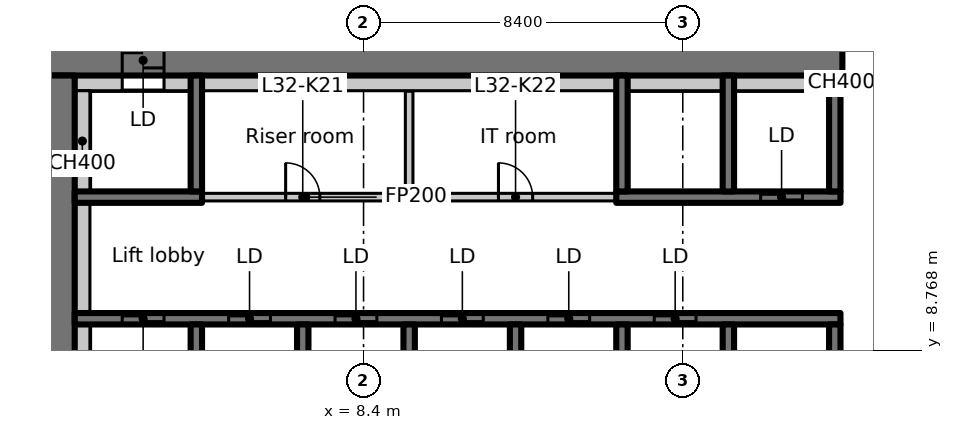
"""IFC4 building model, lengths in metres.
Left out: names, types, materials, properties, quantities, classifications, styles, units other than length and angle.
Written with IfcOpenShell. Run it as: python <this file> out.ifc"""

import sys

from ifc_helpers import new_model, si_unit, direction, frame, frame_2d, origin, place, context, subcontext, project, spatial, rectangle, extrude, element, fill, save


model = new_model("IFC4")
c1 = context("Model", 3, precision=1e-05, world=origin(), true_north=direction((0.0, 1.0)))
c2 = subcontext(c1, "Body", "Model", "MODEL_VIEW")
j1 = project(units=[si_unit("LENGTHUNIT", "METRE"), si_unit("PLANEANGLEUNIT", "RADIAN")], contexts=[c1])
p1 = place(None, origin())
s1 = spatial("IfcSite", under=j1, at=p1, CompositionType="ELEMENT")
p2 = place(p1, origin())
s2 = spatial("IfcBuilding", under=s1, at=p2, CompositionType="ELEMENT")
p3 = place(p2, frame((0.0, 0.0, 131.3)))
s3 = spatial("IfcBuildingStorey", under=s2, at=p3, CompositionType="ELEMENT", Elevation=131.3)
p4 = place(p3, frame((-1.1, 16.4, 0.0), z_axis=(0.0, 0.0, 1.0), x_axis=(1.0, 0.0, 0.0)))
e1 = element("IfcWall", 1, at=p4, inside=s3, PredefinedType="SHEAR", context=c2, shape_type="SweptSolid", body=[
    extrude(rectangle(XDim=22.1, YDim=0.8, at=frame_2d((11.05, 0.0))), origin(), (0.0, 0.0, 1.0), 3.35),
])
p5 = place(p4, frame((3.15, 0.0, 0.0)))
e2 = element("IfcOpeningElement", 2, at=p5, cuts=e1, PredefinedType="OPENING", context=c2, shape_type="SweptSolid", body=[
    extrude(rectangle(XDim=1.1, YDim=2.3, at=frame_2d((0.55, 1.15))), frame((0.0, 0.41, 0.0), z_axis=(0.0, -1.0, 0.0), x_axis=(1.0, 0.0, 0.0)), (0.0, 0.0, 1.0), 0.82),
])
p6 = place(p3, frame((0.4, 7.136, 0.0), z_axis=(0.0, 0.0, 1.0), x_axis=(0.0, 1.0, 0.0)))
e3 = element("IfcWall", 3, at=p6, inside=s3, PredefinedType="SHEAR", context=c2, shape_type="SweptSolid", body=[
    extrude(rectangle(XDim=8.864, YDim=0.8, at=frame_2d((4.432, 0.0))), origin(), (0.0, 0.0, 1.0), 3.35),
])
p7 = place(p3, frame((0.8, 15.8, 0.0), z_axis=(0.0, 0.0, 1.0), x_axis=(1.0, 0.0, 0.0)))
e4 = element("IfcWall", 4, at=p7, inside=s3, PredefinedType="PARTITIONING", context=c2, shape_type="SweptSolid", body=[
    extrude(rectangle(XDim=1.25, YDim=0.4, at=frame_2d((0.625, 0.0))), origin(), (0.0, 0.0, 1.0), 3.35),
])
p8 = place(p3, frame((0.8, 9.6, 0.0), z_axis=(0.0, 0.0, 1.0), x_axis=(1.0, 0.0, 0.0)))
e5 = element("IfcWall", 5, at=p8, inside=s3, PredefinedType="SHEAR", context=c2, shape_type="SweptSolid", body=[
    extrude(rectangle(XDim=20.15, YDim=0.3, at=frame_2d((10.075, 0.0))), origin(), (0.0, 0.0, 1.0), 3.35),
])
p9 = place(p8, frame((1.25, 0.0, 0.0)))
e6 = element("IfcOpeningElement", 6, at=p9, cuts=e5, PredefinedType="OPENING", context=c2, shape_type="SweptSolid", body=[
    extrude(rectangle(XDim=1.1, YDim=2.3, at=frame_2d((0.55, 1.15))), frame((0.0, 0.16, 0.0), z_axis=(0.0, -1.0, 0.0), x_axis=(1.0, 0.0, 0.0)), (0.0, 0.0, 1.0), 0.32),
])
p10 = place(p8, frame((4.05, 0.0, 0.0)))
e7 = element("IfcOpeningElement", 7, at=p10, cuts=e5, PredefinedType="OPENING", context=c2, shape_type="SweptSolid", body=[
    extrude(rectangle(XDim=1.1, YDim=2.3, at=frame_2d((0.55, 1.15))), frame((0.0, 0.16, 0.0), z_axis=(0.0, -1.0, 0.0), x_axis=(1.0, 0.0, 0.0)), (0.0, 0.0, 1.0), 0.32),
])
p11 = place(p8, frame((6.85, 0.0, 0.0)))
e8 = element("IfcOpeningElement", 8, at=p11, cuts=e5, PredefinedType="OPENING", context=c2, shape_type="SweptSolid", body=[
    extrude(rectangle(XDim=1.1, YDim=2.3, at=frame_2d((0.55, 1.15))), frame((0.0, 0.16, 0.0), z_axis=(0.0, -1.0, 0.0), x_axis=(1.0, 0.0, 0.0)), (0.0, 0.0, 1.0), 0.32),
])
p12 = place(p8, frame((9.65, 0.0, 0.0)))
e9 = element("IfcOpeningElement", 9, at=p12, cuts=e5, PredefinedType="OPENING", context=c2, shape_type="SweptSolid", body=[
    extrude(rectangle(XDim=1.1, YDim=2.3, at=frame_2d((0.55, 1.15))), frame((0.0, 0.16, 0.0), z_axis=(0.0, -1.0, 0.0), x_axis=(1.0, 0.0, 0.0)), (0.0, 0.0, 1.0), 0.32),
])
p13 = place(p8, frame((12.45, 0.0, 0.0)))
e10 = element("IfcOpeningElement", 10, at=p13, cuts=e5, PredefinedType="OPENING", context=c2, shape_type="SweptSolid", body=[
    extrude(rectangle(XDim=1.1, YDim=2.3, at=frame_2d((0.55, 1.15))), frame((0.0, 0.16, 0.0), z_axis=(0.0, -1.0, 0.0), x_axis=(1.0, 0.0, 0.0)), (0.0, 0.0, 1.0), 0.32),
])
p14 = place(p8, frame((15.25, 0.0, 0.0)))
e11 = element("IfcOpeningElement", 11, at=p14, cuts=e5, PredefinedType="OPENING", context=c2, shape_type="SweptSolid", body=[
    extrude(rectangle(XDim=1.1, YDim=2.3, at=frame_2d((0.55, 1.15))), frame((0.0, 0.16, 0.0), z_axis=(0.0, -1.0, 0.0), x_axis=(1.0, 0.0, 0.0)), (0.0, 0.0, 1.0), 0.32),
])
for number, where, z_axis, x_axis in (
    (12, (4.0, 7.15, 0.0), (0.0, 0.0, 1.0), (0.0, 1.0, 0.0)),
    (13, (6.8, 7.15, 0.0), (0.0, 0.0, 1.0), (0.0, 1.0, 0.0)),
    (14, (9.6, 7.15, 0.0), (0.0, 0.0, 1.0), (0.0, 1.0, 0.0)),
    (15, (12.4, 7.15, 0.0), (0.0, 0.0, 1.0), (0.0, 1.0, 0.0)),
    (16, (15.2, 7.15, 0.0), (0.0, 0.0, 1.0), (0.0, 1.0, 0.0)),
    (17, (18.0, 7.15, 0.0), (0.0, 0.0, 1.0), (0.0, 1.0, 0.0)),
    (18, (20.8, 7.15, 0.0), (0.0, 0.0, 1.0), (0.0, 1.0, 0.0)),
):
    element("IfcWall", number, at=place(p3, frame(where, z_axis=z_axis, x_axis=x_axis)), inside=s3, PredefinedType="SHEAR", context=c2, shape_type="SweptSolid", body=[
        extrude(rectangle(XDim=2.3, YDim=0.3, at=frame_2d((1.15, 0.0))), origin(), (0.0, 0.0, 1.0), 3.35),
    ])
p15 = place(p3, frame((0.8, 12.8, 0.0), z_axis=(0.0, 0.0, 1.0), x_axis=(1.0, 0.0, 0.0)))
e19 = element("IfcWall", 19, at=p15, inside=s3, PredefinedType="SHEAR", context=c2, shape_type="SweptSolid", body=[
    extrude(rectangle(XDim=3.35, YDim=0.3, at=frame_2d((1.675, 0.0))), origin(), (0.0, 0.0, 1.0), 3.35),
])
p16 = place(p3, frame((4.0, 12.95, 0.0), z_axis=(0.0, 0.0, 1.0), x_axis=(0.0, 1.0, 0.0)))
e20 = element("IfcWall", 20, at=p16, inside=s3, PredefinedType="SHEAR", context=c2, shape_type="SweptSolid", body=[
    extrude(rectangle(XDim=3.05, YDim=0.3, at=frame_2d((1.525, 0.0))), origin(), (0.0, 0.0, 1.0), 3.35),
])
p17 = place(p3, frame((15.05, 12.8, 0.0), z_axis=(0.0, 0.0, 1.0), x_axis=(1.0, 0.0, 0.0)))
e21 = element("IfcWall", 21, at=p17, inside=s3, PredefinedType="SHEAR", context=c2, shape_type="SweptSolid", body=[
    extrude(rectangle(XDim=5.9, YDim=0.3, at=frame_2d((2.95, 0.0))), origin(), (0.0, 0.0, 1.0), 3.35),
])
p18 = place(p17, frame((3.8, 0.0, 0.0)))
e22 = element("IfcOpeningElement", 22, at=p18, cuts=e21, PredefinedType="OPENING", context=c2, shape_type="SweptSolid", body=[
    extrude(rectangle(XDim=1.1, YDim=2.3, at=frame_2d((0.55, 1.15))), frame((0.0, 0.16, 0.0), z_axis=(0.0, -1.0, 0.0), x_axis=(1.0, 0.0, 0.0)), (0.0, 0.0, 1.0), 0.32),
])
for number, where, z_axis, x_axis in (
    (23, (15.2, 12.95, 0.0), (0.0, 0.0, 1.0), (0.0, 1.0, 0.0)),
    (24, (18.0, 12.95, 0.0), (0.0, 0.0, 1.0), (0.0, 1.0, 0.0)),
    (25, (20.8, 12.95, 0.0), (0.0, 0.0, 1.0), (0.0, 1.0, 0.0)),
):
    element("IfcWall", number, at=place(p3, frame(where, z_axis=z_axis, x_axis=x_axis)), inside=s3, PredefinedType="SHEAR", context=c2, shape_type="SweptSolid", body=[
        extrude(rectangle(XDim=3.05, YDim=0.3, at=frame_2d((1.525, 0.0))), origin(), (0.0, 0.0, 1.0), 3.35),
    ])
p19 = place(p3, frame((4.162, 12.8, 0.0), z_axis=(0.0, 0.0, 1.0), x_axis=(1.0, 0.0, 0.0)))
e26 = element("IfcWall", 26, at=p19, inside=s3, PredefinedType="PARTITIONING", context=c2, shape_type="SweptSolid", body=[
    extrude(rectangle(XDim=5.438, YDim=0.2, at=frame_2d((2.719, 0.0))), origin(), (0.0, 0.0, 1.0), 3.35),
])
p20 = place(p19, frame((2.188, 0.0, 0.0)))
e27 = element("IfcOpeningElement", 27, at=p20, cuts=e26, PredefinedType="OPENING", context=c2, shape_type="SweptSolid", body=[
    extrude(rectangle(XDim=0.9, YDim=2.1, at=frame_2d((0.45, 1.05))), frame((0.0, 0.11, 0.0), z_axis=(0.0, -1.0, 0.0), x_axis=(1.0, 0.0, 0.0)), (0.0, 0.0, 1.0), 0.22),
])
p21 = place(p3, frame((9.6, 12.8, 0.0), z_axis=(0.0, 0.0, 1.0), x_axis=(1.0, 0.0, 0.0)))
e28 = element("IfcWall", 28, at=p21, inside=s3, PredefinedType="PARTITIONING", context=c2, shape_type="SweptSolid", body=[
    extrude(rectangle(XDim=5.438, YDim=0.2, at=frame_2d((2.719, 0.0))), origin(), (0.0, 0.0, 1.0), 3.35),
])
p22 = place(p21, frame((2.35, 0.0, 0.0)))
e29 = element("IfcOpeningElement", 29, at=p22, cuts=e28, PredefinedType="OPENING", context=c2, shape_type="SweptSolid", body=[
    extrude(rectangle(XDim=0.9, YDim=2.1, at=frame_2d((0.45, 1.05))), frame((0.0, 0.11, 0.0), z_axis=(0.0, -1.0, 0.0), x_axis=(1.0, 0.0, 0.0)), (0.0, 0.0, 1.0), 0.22),
])
p23 = place(p3, frame((9.6, 15.588, 0.0), z_axis=(0.0, 0.0, 1.0), x_axis=(0.0, -1.0, 0.0)))
e30 = element("IfcWall", 30, at=p23, inside=s3, PredefinedType="PARTITIONING", context=c2, shape_type="SweptSolid", body=[
    extrude(rectangle(XDim=2.688, YDim=0.2, at=frame_2d((1.344, 0.0))), origin(), (0.0, 0.0, 1.0), 3.35),
])
p24 = place(p3, frame((1.0, 7.15, 0.0), z_axis=(0.0, 0.0, 1.0), x_axis=(0.0, 1.0, 0.0)))
e31 = element("IfcWall", 31, at=p24, inside=s3, PredefinedType="PARTITIONING", context=c2, shape_type="SweptSolid", body=[
    extrude(rectangle(XDim=2.3, YDim=0.4, at=frame_2d((1.15, 0.0))), origin(), (0.0, 0.0, 1.0), 3.35),
])
p25 = place(p3, frame((1.0, 9.75, 0.0), z_axis=(0.0, 0.0, 1.0), x_axis=(0.0, 1.0, 0.0)))
e32 = element("IfcWall", 32, at=p25, inside=s3, PredefinedType="PARTITIONING", context=c2, shape_type="SweptSolid", body=[
    extrude(rectangle(XDim=2.9, YDim=0.4, at=frame_2d((1.45, 0.0))), origin(), (0.0, 0.0, 1.0), 3.35),
])
p26 = place(p3, frame((1.0, 12.95, 0.0), z_axis=(0.0, 0.0, 1.0), x_axis=(0.0, 1.0, 0.0)))
e33 = element("IfcWall", 33, at=p26, inside=s3, PredefinedType="PARTITIONING", context=c2, shape_type="SweptSolid", body=[
    extrude(rectangle(XDim=2.65, YDim=0.4, at=frame_2d((1.325, 0.0))), origin(), (0.0, 0.0, 1.0), 3.35),
])
p27 = place(p3, frame((3.15, 15.8, 0.0), z_axis=(0.0, 0.0, 1.0), x_axis=(1.0, 0.0, 0.0)))
e34 = element("IfcWall", 34, at=p27, inside=s3, PredefinedType="PARTITIONING", context=c2, shape_type="SweptSolid", body=[
    extrude(rectangle(XDim=0.7, YDim=0.4, at=frame_2d((0.35, 0.0))), origin(), (0.0, 0.0, 1.0), 3.35),
])
p28 = place(p3, frame((4.15, 15.8, 0.0), z_axis=(0.0, 0.0, 1.0), x_axis=(1.0, 0.0, 0.0)))
e35 = element("IfcWall", 35, at=p28, inside=s3, PredefinedType="PARTITIONING", context=c2, shape_type="SweptSolid", body=[
    extrude(rectangle(XDim=10.9, YDim=0.4, at=frame_2d((5.45, 0.0))), origin(), (0.0, 0.0, 1.0), 3.35),
])
for number, where, z_axis, x_axis in (
    (36, (15.35, 15.8, 0.0), (0.0, 0.0, 1.0), (1.0, 0.0, 0.0)),
    (37, (18.15, 15.8, 0.0), (0.0, 0.0, 1.0), (1.0, 0.0, 0.0)),
):
    element("IfcWall", number, at=place(p3, frame(where, z_axis=z_axis, x_axis=x_axis)), inside=s3, PredefinedType="PARTITIONING", context=c2, shape_type="SweptSolid", body=[
        extrude(rectangle(XDim=2.5, YDim=0.4, at=frame_2d((1.25, 0.0))), origin(), (0.0, 0.0, 1.0), 3.35),
    ])
p29 = place(p3, frame((20.95, 15.8, 0.0), z_axis=(0.0, 0.0, 1.0), x_axis=(1.0, 0.0, 0.0)))
e38 = element("IfcWall", 38, at=p29, inside=s3, PredefinedType="PARTITIONING", context=c2, shape_type="SweptSolid", body=[
    extrude(rectangle(XDim=0.05, YDim=0.4, at=frame_2d((0.025, 0.0))), origin(), (0.0, 0.0, 1.0), 3.35),
])
p30 = place(p9, origin())
e39 = element("IfcDoor", 39, at=p30, inside=s3, OperationType="SLIDING_TO_LEFT", PredefinedType="DOOR", context=c2, shape_type="SweptSolid", body=[
    extrude(rectangle(XDim=1.1, YDim=2.3, at=frame_2d((0.55, 1.15))), frame((0.0, 0.025, 0.0), z_axis=(0.0, -1.0, 0.0), x_axis=(1.0, 0.0, 0.0)), (0.0, 0.0, 1.0), 0.05),
])
fill(e6, e39)
p31 = place(p10, origin())
e40 = element("IfcDoor", 40, at=p31, inside=s3, OperationType="SLIDING_TO_LEFT", PredefinedType="DOOR", context=c2, shape_type="SweptSolid", body=[
    extrude(rectangle(XDim=1.1, YDim=2.3, at=frame_2d((0.55, 1.15))), frame((0.0, 0.025, 0.0), z_axis=(0.0, -1.0, 0.0), x_axis=(1.0, 0.0, 0.0)), (0.0, 0.0, 1.0), 0.05),
])
fill(e7, e40)
p32 = place(p11, origin())
e41 = element("IfcDoor", 41, at=p32, inside=s3, OperationType="SLIDING_TO_LEFT", PredefinedType="DOOR", context=c2, shape_type="SweptSolid", body=[
    extrude(rectangle(XDim=1.1, YDim=2.3, at=frame_2d((0.55, 1.15))), frame((0.0, 0.025, 0.0), z_axis=(0.0, -1.0, 0.0), x_axis=(1.0, 0.0, 0.0)), (0.0, 0.0, 1.0), 0.05),
])
fill(e8, e41)
p33 = place(p12, origin())
e42 = element("IfcDoor", 42, at=p33, inside=s3, OperationType="SLIDING_TO_LEFT", PredefinedType="DOOR", context=c2, shape_type="SweptSolid", body=[
    extrude(rectangle(XDim=1.1, YDim=2.3, at=frame_2d((0.55, 1.15))), frame((0.0, 0.025, 0.0), z_axis=(0.0, -1.0, 0.0), x_axis=(1.0, 0.0, 0.0)), (0.0, 0.0, 1.0), 0.05),
])
fill(e9, e42)
p34 = place(p13, origin())
e43 = element("IfcDoor", 43, at=p34, inside=s3, OperationType="SLIDING_TO_LEFT", PredefinedType="DOOR", context=c2, shape_type="SweptSolid", body=[
    extrude(rectangle(XDim=1.1, YDim=2.3, at=frame_2d((0.55, 1.15))), frame((0.0, 0.025, 0.0), z_axis=(0.0, -1.0, 0.0), x_axis=(1.0, 0.0, 0.0)), (0.0, 0.0, 1.0), 0.05),
])
fill(e10, e43)
p35 = place(p14, origin())
e44 = element("IfcDoor", 44, at=p35, inside=s3, OperationType="SLIDING_TO_LEFT", PredefinedType="DOOR", context=c2, shape_type="SweptSolid", body=[
    extrude(rectangle(XDim=1.1, YDim=2.3, at=frame_2d((0.55, 1.15))), frame((0.0, 0.025, 0.0), z_axis=(0.0, -1.0, 0.0), x_axis=(1.0, 0.0, 0.0)), (0.0, 0.0, 1.0), 0.05),
])
fill(e11, e44)
p36 = place(p5, origin())
e45 = element("IfcDoor", 45, at=p36, inside=s3, OperationType="SLIDING_TO_LEFT", PredefinedType="DOOR", context=c2, shape_type="SweptSolid", body=[
    extrude(rectangle(XDim=1.1, YDim=2.3, at=frame_2d((0.55, 1.15))), frame((0.0, 0.025, 0.0), z_axis=(0.0, -1.0, 0.0), x_axis=(1.0, 0.0, 0.0)), (0.0, 0.0, 1.0), 0.05),
])
fill(e2, e45)
p37 = place(p18, origin())
e46 = element("IfcDoor", 46, at=p37, inside=s3, OperationType="SLIDING_TO_LEFT", PredefinedType="DOOR", context=c2, shape_type="SweptSolid", body=[
    extrude(rectangle(XDim=1.1, YDim=2.3, at=frame_2d((0.55, 1.15))), frame((0.0, 0.025, 0.0), z_axis=(0.0, -1.0, 0.0), x_axis=(1.0, 0.0, 0.0)), (0.0, 0.0, 1.0), 0.05),
])
fill(e22, e46)
p38 = place(p20, origin())
e47 = element("IfcDoor", 47, at=p38, inside=s3, OperationType="SINGLE_SWING_RIGHT", PredefinedType="DOOR", context=c2, shape_type="SweptSolid", body=[
    extrude(rectangle(XDim=0.9, YDim=2.1, at=frame_2d((0.45, 1.05))), frame((0.0, 0.025, 0.0), z_axis=(0.0, -1.0, 0.0), x_axis=(1.0, 0.0, 0.0)), (0.0, 0.0, 1.0), 0.05),
])
fill(e27, e47)
p39 = place(p22, origin())
e48 = element("IfcDoor", 48, at=p39, inside=s3, OperationType="SINGLE_SWING_LEFT", PredefinedType="DOOR", context=c2, shape_type="SweptSolid", body=[
    extrude(rectangle(XDim=0.9, YDim=2.1, at=frame_2d((0.45, 1.05))), frame((0.0, 0.025, 0.0), z_axis=(0.0, -1.0, 0.0), x_axis=(1.0, 0.0, 0.0)), (0.0, 0.0, 1.0), 0.05),
])
fill(e29, e48)
save(model, sys.argv[1])
